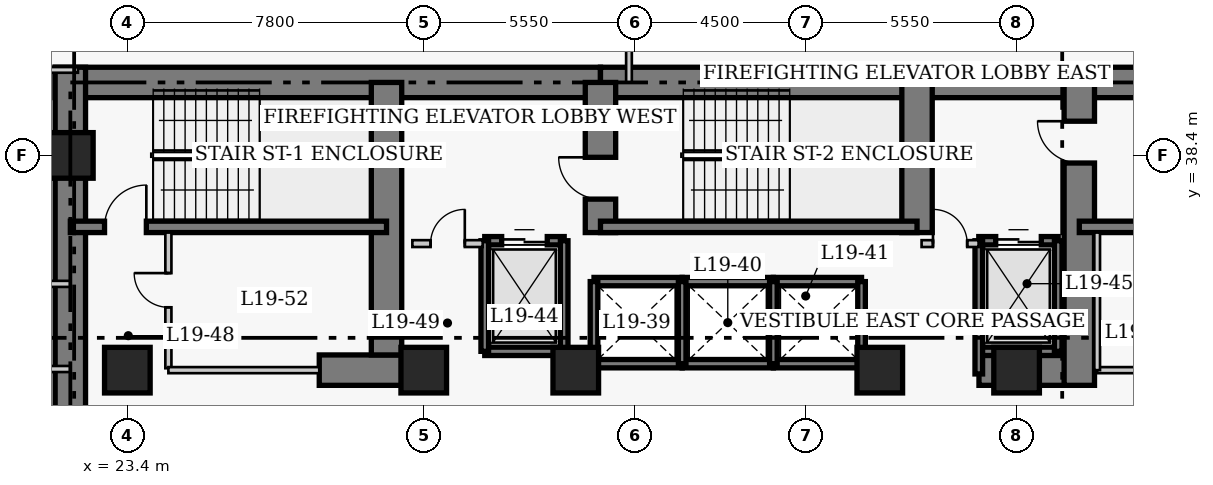
"""IFC4 building model, lengths in metres.
Left out: names, types, materials, properties, quantities, classifications, styles, units other than length and angle.
Written with IfcOpenShell. Run it as: python <this file> out.ifc"""

import sys

from ifc_helpers import new_model, si_unit, direction, frame, frame_2d, origin, origin_2d, place, context, subcontext, project, spatial, rectangle, extrude, element, fill, save


model = new_model("IFC4")
c1 = context("Model", 3, precision=1e-05, world=origin(), true_north=direction((0.0, 1.0)))
c2 = subcontext(c1, "Body", "Model", "MODEL_VIEW")
j1 = project(units=[si_unit("LENGTHUNIT", "METRE"), si_unit("PLANEANGLEUNIT", "RADIAN")], contexts=[c1])
p1 = place(None, origin())
s1 = spatial("IfcSite", under=j1, at=p1, CompositionType="ELEMENT")
p2 = place(p1, origin())
s2 = spatial("IfcBuilding", under=s1, at=p2, CompositionType="ELEMENT")
p3 = place(p2, frame((0.0, 0.0, 80.4)))
s3 = spatial("IfcBuildingStorey", under=s2, at=p3, CompositionType="ELEMENT", Elevation=80.4)
p4 = place(p3, frame((21.5, 40.32, 0.0), z_axis=(0.0, 0.0, 1.0), x_axis=(1.0, 0.0, 0.0)))
e1 = element("IfcWall", 1, at=p4, inside=s3, PredefinedType="SHEAR", context=c2, shape_type="SweptSolid", body=[
    extrude(rectangle(XDim=14.35, YDim=0.8, at=frame_2d((7.175, 0.0))), origin(), (0.0, 0.0, 1.0), 3.8),
])
p5 = place(p3, frame((35.85, 40.32, 0.0), z_axis=(0.0, 0.0, 1.0), x_axis=(1.0, 0.0, 0.0)))
e2 = element("IfcWall", 2, at=p5, inside=s3, PredefinedType="SHEAR", context=c2, shape_type="SweptSolid", body=[
    extrude(rectangle(XDim=12.6, YDim=0.8, at=frame_2d((6.3, 0.0))), origin(), (0.0, 0.0, 1.0), 3.8),
])
p6 = place(p3, frame((48.45, 40.32, 0.0), z_axis=(0.0, 0.0, 1.0), x_axis=(1.0, 0.0, 0.0)))
e3 = element("IfcWall", 3, at=p6, inside=s3, PredefinedType="SHEAR", context=c2, shape_type="SweptSolid", body=[
    extrude(rectangle(XDim=8.87, YDim=0.8, at=frame_2d((4.435, 0.0))), origin(), (0.0, 0.0, 1.0), 3.8),
])
p7 = place(p3, frame((21.9, 27.05, 0.0), z_axis=(0.0, 0.0, 1.0), x_axis=(0.0, 1.0, 0.0)))
e4 = element("IfcWall", 4, at=p7, inside=s3, PredefinedType="SHEAR", context=c2, shape_type="SweptSolid", body=[
    extrude(rectangle(XDim=13.67, YDim=0.8, at=frame_2d((6.835, 0.0))), origin(), (0.0, 0.0, 1.0), 3.8),
])
p8 = place(p3, frame((28.45, 32.75, 0.0), z_axis=(0.0, 0.0, 1.0), x_axis=(1.0, 0.0, 0.0)))
e5 = element("IfcWall", 5, at=p8, inside=s3, PredefinedType="SHEAR", context=c2, shape_type="SweptSolid", body=[
    extrude(rectangle(XDim=2.4, YDim=0.8, at=frame_2d((1.2, 0.0))), origin(), (0.0, 0.0, 1.0), 3.8),
])
p9 = place(p3, frame((45.81, 32.75, 0.0), z_axis=(0.0, 0.0, 1.0), x_axis=(1.0, 0.0, 0.0)))
e6 = element("IfcWall", 6, at=p9, inside=s3, PredefinedType="SHEAR", context=c2, shape_type="SweptSolid", body=[
    extrude(rectangle(XDim=2.64, YDim=0.8, at=frame_2d((1.32, 0.0))), origin(), (0.0, 0.0, 1.0), 3.8),
])
p10 = place(p3, frame((30.22, 33.15, 0.0), z_axis=(0.0, 0.0, 1.0), x_axis=(0.0, 1.0, 0.0)))
e7 = element("IfcWall", 7, at=p10, inside=s3, PredefinedType="SHEAR", context=c2, shape_type="SweptSolid", body=[
    extrude(rectangle(XDim=7.17, YDim=0.8, at=frame_2d((3.585, 0.0))), origin(), (0.0, 0.0, 1.0), 3.8),
])
p11 = place(p3, frame((35.85, 36.37, 0.0), z_axis=(0.0, 0.0, 1.0), x_axis=(0.0, 1.0, 0.0)))
e8 = element("IfcWall", 8, at=p11, inside=s3, PredefinedType="SHEAR", context=c2, shape_type="SweptSolid", body=[
    extrude(rectangle(XDim=3.95, YDim=0.8, at=frame_2d((1.975, 0.0))), origin(), (0.0, 0.0, 1.0), 3.8),
])
p12 = place(p11, frame((0.88, 0.0, 0.0)))
e9 = element("IfcOpeningElement", 9, at=p12, cuts=e8, PredefinedType="OPENING", context=c2, shape_type="SweptSolid", body=[
    extrude(rectangle(XDim=1.1, YDim=2.15, at=frame_2d((0.55, 1.075))), frame((0.0, 0.41, 0.0), z_axis=(0.0, -1.0, 0.0), x_axis=(1.0, 0.0, 0.0)), (0.0, 0.0, 1.0), 0.82),
])
p13 = place(p3, frame((44.18, 36.37, 0.0), z_axis=(0.0, 0.0, 1.0), x_axis=(0.0, 1.0, 0.0)))
e10 = element("IfcWall", 10, at=p13, inside=s3, PredefinedType="SHEAR", context=c2, shape_type="SweptSolid", body=[
    extrude(rectangle(XDim=3.95, YDim=0.8, at=frame_2d((1.975, 0.0))), origin(), (0.0, 0.0, 1.0), 3.8),
])
p14 = place(p3, frame((48.45, 32.35, 0.0), z_axis=(0.0, 0.0, 1.0), x_axis=(0.0, 1.0, 0.0)))
e11 = element("IfcWall", 11, at=p14, inside=s3, PredefinedType="SHEAR", context=c2, shape_type="SweptSolid", body=[
    extrude(rectangle(XDim=7.97, YDim=0.8, at=frame_2d((3.985, 0.0))), origin(), (0.0, 0.0, 1.0), 3.8),
])
p15 = place(p14, frame((5.85, 0.0, 0.0)))
e12 = element("IfcOpeningElement", 12, at=p15, cuts=e11, PredefinedType="OPENING", context=c2, shape_type="SweptSolid", body=[
    extrude(rectangle(XDim=1.1, YDim=2.15, at=frame_2d((0.55, 1.075))), frame((0.0, 0.41, 0.0), z_axis=(0.0, -1.0, 0.0), x_axis=(1.0, 0.0, 0.0)), (0.0, 0.0, 1.0), 0.82),
])
p16 = place(p3, frame((21.9, 36.52, 0.0), z_axis=(0.0, 0.0, 1.0), x_axis=(1.0, 0.0, 0.0)))
e13 = element("IfcWall", 13, at=p16, inside=s3, PredefinedType="SHEAR", context=c2, shape_type="SweptSolid", body=[
    extrude(rectangle(XDim=8.32, YDim=0.3, at=frame_2d((4.16, 0.0))), origin(), (0.0, 0.0, 1.0), 3.8),
])
p17 = place(p16, frame((0.9, 0.0, 0.0)))
e14 = element("IfcOpeningElement", 14, at=p17, cuts=e13, PredefinedType="OPENING", context=c2, shape_type="SweptSolid", body=[
    extrude(rectangle(XDim=1.1, YDim=2.15, at=frame_2d((0.55, 1.075))), frame((0.0, 0.16, 0.0), z_axis=(0.0, -1.0, 0.0), x_axis=(1.0, 0.0, 0.0)), (0.0, 0.0, 1.0), 0.32),
])
p18 = place(p3, frame((35.85, 36.52, 0.0), z_axis=(0.0, 0.0, 1.0), x_axis=(1.0, 0.0, 0.0)))
e15 = element("IfcWall", 15, at=p18, inside=s3, PredefinedType="SHEAR", context=c2, shape_type="SweptSolid", body=[
    extrude(rectangle(XDim=8.33, YDim=0.3, at=frame_2d((4.165, 0.0))), origin(), (0.0, 0.0, 1.0), 3.8),
])
p19 = place(p3, frame((48.45, 36.52, 0.0), z_axis=(0.0, 0.0, 1.0), x_axis=(1.0, 0.0, 0.0)))
e16 = element("IfcWall", 16, at=p19, inside=s3, PredefinedType="SHEAR", context=c2, shape_type="SweptSolid", body=[
    extrude(rectangle(XDim=8.47, YDim=0.3, at=frame_2d((4.235, 0.0))), origin(), (0.0, 0.0, 1.0), 3.8),
])
for number, where, z_axis, x_axis in (
    (17, (21.9, 38.4, 0.0), (0.0, 0.0, 1.0), (1.0, 0.0, 0.0)),
    (18, (23.4, 32.75, 0.0), (0.0, 0.0, 1.0), (1.0, 0.0, 0.0)),
    (19, (31.2, 32.75, 0.0), (0.0, 0.0, 1.0), (1.0, 0.0, 0.0)),
    (20, (35.2, 32.75, 0.0), (0.0, 0.0, 1.0), (1.0, 0.0, 0.0)),
    (21, (43.2, 32.75, 0.0), (0.0, 0.0, 1.0), (1.0, 0.0, 0.0)),
    (22, (46.8, 32.75, 0.0), (0.0, 0.0, 1.0), (1.0, 0.0, 0.0)),
):
    element("IfcColumn", number, at=place(p3, frame(where, z_axis=z_axis, x_axis=x_axis)), inside=s3, PredefinedType="COLUMN", context=c2, shape_type="SweptSolid", body=[
        extrude(rectangle(XDim=1.2, YDim=1.2, at=origin_2d()), origin(), (0.0, 0.0, 1.0), 3.8),
    ])
for number, where, z_axis, x_axis in (
    (23, (35.68, 35.08, 0.0), (0.0, 0.0, 1.0), (1.0, 0.0, 0.0)),
    (24, (35.68, 32.92, 0.0), (0.0, 0.0, 1.0), (1.0, 0.0, 0.0)),
):
    element("IfcWall", number, at=place(p3, frame(where, z_axis=z_axis, x_axis=x_axis)), inside=s3, PredefinedType="SHEAR", context=c2, shape_type="SweptSolid", body=[
        extrude(rectangle(XDim=2.32, YDim=0.22, at=frame_2d((1.16, 0.0))), origin(), (0.0, 0.0, 1.0), 3.8),
    ])
p20 = place(p3, frame((35.68, 32.92, 0.0), z_axis=(0.0, 0.0, 1.0), x_axis=(0.0, 1.0, 0.0)))
e25 = element("IfcWall", 25, at=p20, inside=s3, PredefinedType="SHEAR", context=c2, shape_type="SweptSolid", body=[
    extrude(rectangle(XDim=2.16, YDim=0.2, at=frame_2d((1.08, 0.0))), origin(), (0.0, 0.0, 1.0), 3.8),
])
for number, where, z_axis, x_axis in (
    (26, (38.0, 35.08, 0.0), (0.0, 0.0, 1.0), (1.0, 0.0, 0.0)),
    (27, (38.0, 32.92, 0.0), (0.0, 0.0, 1.0), (1.0, 0.0, 0.0)),
):
    element("IfcWall", number, at=place(p3, frame(where, z_axis=z_axis, x_axis=x_axis)), inside=s3, PredefinedType="SHEAR", context=c2, shape_type="SweptSolid", body=[
        extrude(rectangle(XDim=2.4, YDim=0.22, at=frame_2d((1.2, 0.0))), origin(), (0.0, 0.0, 1.0), 3.8),
    ])
p21 = place(p3, frame((38.0, 32.92, 0.0), z_axis=(0.0, 0.0, 1.0), x_axis=(0.0, 1.0, 0.0)))
e28 = element("IfcWall", 28, at=p21, inside=s3, PredefinedType="SHEAR", context=c2, shape_type="SweptSolid", body=[
    extrude(rectangle(XDim=2.16, YDim=0.2, at=frame_2d((1.08, 0.0))), origin(), (0.0, 0.0, 1.0), 3.8),
])
for number, where, z_axis, x_axis in (
    (29, (40.4, 35.08, 0.0), (0.0, 0.0, 1.0), (1.0, 0.0, 0.0)),
    (30, (40.4, 32.92, 0.0), (0.0, 0.0, 1.0), (1.0, 0.0, 0.0)),
):
    element("IfcWall", number, at=place(p3, frame(where, z_axis=z_axis, x_axis=x_axis)), inside=s3, PredefinedType="SHEAR", context=c2, shape_type="SweptSolid", body=[
        extrude(rectangle(XDim=2.32, YDim=0.22, at=frame_2d((1.16, 0.0))), origin(), (0.0, 0.0, 1.0), 3.8),
    ])
for number, where, z_axis, x_axis in (
    (31, (40.4, 32.92, 0.0), (0.0, 0.0, 1.0), (0.0, 1.0, 0.0)),
    (32, (42.72, 32.92, 0.0), (0.0, 0.0, 1.0), (0.0, 1.0, 0.0)),
):
    element("IfcWall", number, at=place(p3, frame(where, z_axis=z_axis, x_axis=x_axis)), inside=s3, PredefinedType="SHEAR", context=c2, shape_type="SweptSolid", body=[
        extrude(rectangle(XDim=2.16, YDim=0.2, at=frame_2d((1.08, 0.0))), origin(), (0.0, 0.0, 1.0), 3.8),
    ])
p22 = place(p3, frame((32.805, 36.155, 0.0), z_axis=(0.0, 0.0, 1.0), x_axis=(1.0, 0.0, 0.0)))
e33 = element("IfcWall", 33, at=p22, inside=s3, PredefinedType="SHEAR", context=c2, shape_type="SweptSolid", body=[
    extrude(rectangle(XDim=2.09, YDim=0.22, at=frame_2d((1.045, 0.0))), origin(), (0.0, 0.0, 1.0), 3.8),
])
p23 = place(p22, frame((0.445, 0.0, 0.0)))
e34 = element("IfcOpeningElement", 34, at=p23, cuts=e33, PredefinedType="OPENING", context=c2, shape_type="SweptSolid", body=[
    extrude(rectangle(XDim=1.2, YDim=2.15, at=frame_2d((0.6, 1.075))), frame((0.0, 0.12, 0.0), z_axis=(0.0, -1.0, 0.0), x_axis=(1.0, 0.0, 0.0)), (0.0, 0.0, 1.0), 0.24),
])
p24 = place(p3, frame((32.805, 33.245, 0.0), z_axis=(0.0, 0.0, 1.0), x_axis=(1.0, 0.0, 0.0)))
e35 = element("IfcWall", 35, at=p24, inside=s3, PredefinedType="SHEAR", context=c2, shape_type="SweptSolid", body=[
    extrude(rectangle(XDim=2.09, YDim=0.22, at=frame_2d((1.045, 0.0))), origin(), (0.0, 0.0, 1.0), 3.8),
])
for number, where, z_axis, x_axis in (
    (36, (32.805, 33.245, 0.0), (0.0, 0.0, 1.0), (0.0, 1.0, 0.0)),
    (37, (34.895, 33.245, 0.0), (0.0, 0.0, 1.0), (0.0, 1.0, 0.0)),
):
    element("IfcWall", number, at=place(p3, frame(where, z_axis=z_axis, x_axis=x_axis)), inside=s3, PredefinedType="SHEAR", context=c2, shape_type="SweptSolid", body=[
        extrude(rectangle(XDim=2.91, YDim=0.2, at=frame_2d((1.455, 0.0))), origin(), (0.0, 0.0, 1.0), 3.8),
    ])
p25 = place(p3, frame((45.805, 36.155, 0.0), z_axis=(0.0, 0.0, 1.0), x_axis=(1.0, 0.0, 0.0)))
e38 = element("IfcWall", 38, at=p25, inside=s3, PredefinedType="SHEAR", context=c2, shape_type="SweptSolid", body=[
    extrude(rectangle(XDim=2.09, YDim=0.22, at=frame_2d((1.045, 0.0))), origin(), (0.0, 0.0, 1.0), 3.8),
])
p26 = place(p25, frame((0.445, 0.0, 0.0)))
e39 = element("IfcOpeningElement", 39, at=p26, cuts=e38, PredefinedType="OPENING", context=c2, shape_type="SweptSolid", body=[
    extrude(rectangle(XDim=1.2, YDim=2.15, at=frame_2d((0.6, 1.075))), frame((0.0, 0.12, 0.0), z_axis=(0.0, -1.0, 0.0), x_axis=(1.0, 0.0, 0.0)), (0.0, 0.0, 1.0), 0.24),
])
p27 = place(p3, frame((45.805, 33.245, 0.0), z_axis=(0.0, 0.0, 1.0), x_axis=(1.0, 0.0, 0.0)))
e40 = element("IfcWall", 40, at=p27, inside=s3, PredefinedType="SHEAR", context=c2, shape_type="SweptSolid", body=[
    extrude(rectangle(XDim=2.09, YDim=0.22, at=frame_2d((1.045, 0.0))), origin(), (0.0, 0.0, 1.0), 3.8),
])
p28 = place(p3, frame((45.805, 32.65, 0.0), z_axis=(0.0, 0.0, 1.0), x_axis=(0.0, 1.0, 0.0)))
e41 = element("IfcWall", 41, at=p28, inside=s3, PredefinedType="SHEAR", context=c2, shape_type="SweptSolid", body=[
    extrude(rectangle(XDim=3.505, YDim=0.2, at=frame_2d((1.752, 0.0))), origin(), (0.0, 0.0, 1.0), 3.8),
])
p29 = place(p3, frame((47.895, 33.245, 0.0), z_axis=(0.0, 0.0, 1.0), x_axis=(0.0, 1.0, 0.0)))
e42 = element("IfcWall", 42, at=p29, inside=s3, PredefinedType="SHEAR", context=c2, shape_type="SweptSolid", body=[
    extrude(rectangle(XDim=2.91, YDim=0.2, at=frame_2d((1.455, 0.0))), origin(), (0.0, 0.0, 1.0), 3.8),
])
p30 = place(p3, frame((30.9, 36.08, 0.0), z_axis=(0.0, 0.0, 1.0), x_axis=(1.0, 0.0, 0.0)))
e43 = element("IfcWall", 43, at=p30, inside=s3, PredefinedType="PARTITIONING", context=c2, shape_type="SweptSolid", body=[
    extrude(rectangle(XDim=1.85, YDim=0.18, at=frame_2d((0.925, 0.0))), origin(), (0.0, 0.0, 1.0), 3.54),
])
p31 = place(p30, frame((0.48, 0.0, 0.0)))
e44 = element("IfcOpeningElement", 44, at=p31, cuts=e43, PredefinedType="OPENING", context=c2, shape_type="SweptSolid", body=[
    extrude(rectangle(XDim=0.9, YDim=2.15, at=frame_2d((0.45, 1.075))), frame((0.0, 0.1, 0.0), z_axis=(0.0, -1.0, 0.0), x_axis=(1.0, 0.0, 0.0)), (0.0, 0.0, 1.0), 0.2),
])
p32 = place(p3, frame((44.3, 36.08, 0.0), z_axis=(0.0, 0.0, 1.0), x_axis=(1.0, 0.0, 0.0)))
e45 = element("IfcWall", 45, at=p32, inside=s3, PredefinedType="PARTITIONING", context=c2, shape_type="SweptSolid", body=[
    extrude(rectangle(XDim=1.5, YDim=0.18, at=frame_2d((0.75, 0.0))), origin(), (0.0, 0.0, 1.0), 3.54),
])
p33 = place(p32, frame((0.3, 0.0, 0.0)))
e46 = element("IfcOpeningElement", 46, at=p33, cuts=e45, PredefinedType="OPENING", context=c2, shape_type="SweptSolid", body=[
    extrude(rectangle(XDim=0.9, YDim=2.15, at=frame_2d((0.45, 1.075))), frame((0.0, 0.1, 0.0), z_axis=(0.0, -1.0, 0.0), x_axis=(1.0, 0.0, 0.0)), (0.0, 0.0, 1.0), 0.2),
])
p34 = place(p3, frame((24.48, 32.8, 0.0), z_axis=(0.0, 0.0, 1.0), x_axis=(0.0, 1.0, 0.0)))
e47 = element("IfcWall", 47, at=p34, inside=s3, PredefinedType="PARTITIONING", context=c2, shape_type="SweptSolid", body=[
    extrude(rectangle(XDim=3.57, YDim=0.16, at=frame_2d((1.785, 0.0))), origin(), (0.0, 0.0, 1.0), 3.54),
])
p35 = place(p34, frame((1.604, 0.0, 0.0)))
e48 = element("IfcOpeningElement", 48, at=p35, cuts=e47, PredefinedType="OPENING", context=c2, shape_type="SweptSolid", body=[
    extrude(rectangle(XDim=0.9, YDim=2.1, at=frame_2d((0.45, 1.05))), frame((0.0, 0.09, 0.0), z_axis=(0.0, -1.0, 0.0), x_axis=(1.0, 0.0, 0.0)), (0.0, 0.0, 1.0), 0.18),
])
p36 = place(p3, frame((24.48, 32.75, 0.0), z_axis=(0.0, 0.0, 1.0), x_axis=(1.0, 0.0, 0.0)))
e49 = element("IfcWall", 49, at=p36, inside=s3, PredefinedType="PARTITIONING", context=c2, shape_type="SweptSolid", body=[
    extrude(rectangle(XDim=3.97, YDim=0.16, at=frame_2d((1.985, 0.0))), origin(), (0.0, 0.0, 1.0), 3.54),
])
p37 = place(p3, frame((48.92, 32.75, 0.0), z_axis=(0.0, 0.0, 1.0), x_axis=(1.0, 0.0, 0.0)))
e50 = element("IfcWall", 50, at=p37, inside=s3, PredefinedType="PARTITIONING", context=c2, shape_type="SweptSolid", body=[
    extrude(rectangle(XDim=2.2, YDim=0.16, at=frame_2d((1.1, 0.0))), origin(), (0.0, 0.0, 1.0), 3.54),
])
p38 = place(p3, frame((48.92, 32.75, 0.0), z_axis=(0.0, 0.0, 1.0), x_axis=(0.0, 1.0, 0.0)))
e51 = element("IfcWall", 51, at=p38, inside=s3, PredefinedType="PARTITIONING", context=c2, shape_type="SweptSolid", body=[
    extrude(rectangle(XDim=3.62, YDim=0.15, at=frame_2d((1.81, 0.0))), origin(), (0.0, 0.0, 1.0), 3.54),
])
for number, where, z_axis, x_axis in (
    (52, (18.86, 35.02, 0.0), (0.0, 0.0, 1.0), (1.0, 0.0, 0.0)),
    (53, (18.86, 32.78, 0.0), (0.0, 0.0, 1.0), (1.0, 0.0, 0.0)),
):
    element("IfcWall", number, at=place(p3, frame(where, z_axis=z_axis, x_axis=x_axis)), inside=s3, PredefinedType="PARTITIONING", context=c2, shape_type="SweptSolid", body=[
        extrude(rectangle(XDim=3.04, YDim=0.16, at=frame_2d((1.52, 0.0))), origin(), (0.0, 0.0, 1.0), 3.54),
    ])
p39 = place(p3, frame((16.64, 40.65, 0.0), z_axis=(0.0, 0.0, 1.0), x_axis=(1.0, 0.0, 0.0)))
e54 = element("IfcWall", 54, at=p39, inside=s3, PredefinedType="PARTITIONING", context=c2, shape_type="SweptSolid", body=[
    extrude(rectangle(XDim=5.46, YDim=0.15, at=frame_2d((2.73, 0.0))), origin(), (0.0, 0.0, 1.0), 3.54),
])
p40 = place(p39, frame((0.55, 0.0, 0.0)))
e55 = element("IfcOpeningElement", 55, at=p40, cuts=e54, PredefinedType="OPENING", context=c2, shape_type="SweptSolid", body=[
    extrude(rectangle(XDim=1.0, YDim=2.15, at=frame_2d((0.5, 1.075))), frame((0.0, 0.085, 0.0), z_axis=(0.0, -1.0, 0.0), x_axis=(1.0, 0.0, 0.0)), (0.0, 0.0, 1.0), 0.17),
])
p41 = place(p3, frame((36.6, 40.32, 0.0), z_axis=(0.0, 0.0, 1.0), x_axis=(0.0, 1.0, 0.0)))
e56 = element("IfcWall", 56, at=p41, inside=s3, PredefinedType="PARTITIONING", context=c2, shape_type="SweptSolid", body=[
    extrude(rectangle(XDim=3.445, YDim=0.15, at=frame_2d((1.723, 0.0))), origin(), (0.0, 0.0, 1.0), 3.54),
])
p42 = place(p23, origin())
e57 = element("IfcDoor", 57, at=p42, inside=s3, OperationType="DOUBLE_DOOR_SLIDING", PredefinedType="DOOR", context=c2, shape_type="SweptSolid", body=[
    extrude(rectangle(XDim=1.2, YDim=2.15, at=frame_2d((0.6, 1.075))), frame((0.0, 0.025, 0.0), z_axis=(0.0, -1.0, 0.0), x_axis=(1.0, 0.0, 0.0)), (0.0, 0.0, 1.0), 0.05),
])
fill(e34, e57)
p43 = place(p26, origin())
e58 = element("IfcDoor", 58, at=p43, inside=s3, OperationType="DOUBLE_DOOR_SLIDING", PredefinedType="DOOR", context=c2, shape_type="SweptSolid", body=[
    extrude(rectangle(XDim=1.2, YDim=2.15, at=frame_2d((0.6, 1.075))), frame((0.0, 0.025, 0.0), z_axis=(0.0, -1.0, 0.0), x_axis=(1.0, 0.0, 0.0)), (0.0, 0.0, 1.0), 0.05),
])
fill(e39, e58)
p44 = place(p31, origin())
e59 = element("IfcDoor", 59, at=p44, inside=s3, OperationType="SINGLE_SWING_RIGHT", PredefinedType="DOOR", context=c2, shape_type="SweptSolid", body=[
    extrude(rectangle(XDim=0.9, YDim=2.15, at=frame_2d((0.45, 1.075))), frame((0.0, 0.025, 0.0), z_axis=(0.0, -1.0, 0.0), x_axis=(1.0, 0.0, 0.0)), (0.0, 0.0, 1.0), 0.05),
])
fill(e44, e59)
p45 = place(p33, origin())
e60 = element("IfcDoor", 60, at=p45, inside=s3, OperationType="SINGLE_SWING_LEFT", PredefinedType="DOOR", context=c2, shape_type="SweptSolid", body=[
    extrude(rectangle(XDim=0.9, YDim=2.15, at=frame_2d((0.45, 1.075))), frame((0.0, 0.025, 0.0), z_axis=(0.0, -1.0, 0.0), x_axis=(1.0, 0.0, 0.0)), (0.0, 0.0, 1.0), 0.05),
])
fill(e46, e60)
p46 = place(p35, origin())
e61 = element("IfcDoor", 61, at=p46, inside=s3, OperationType="SINGLE_SWING_RIGHT", PredefinedType="DOOR", context=c2, shape_type="SweptSolid", body=[
    extrude(rectangle(XDim=0.9, YDim=2.1, at=frame_2d((0.45, 1.05))), frame((0.0, 0.025, 0.0), z_axis=(0.0, -1.0, 0.0), x_axis=(1.0, 0.0, 0.0)), (0.0, 0.0, 1.0), 0.05),
])
fill(e48, e61)
p47 = place(p17, origin())
e62 = element("IfcDoor", 62, at=p47, inside=s3, OperationType="SINGLE_SWING_RIGHT", PredefinedType="DOOR", context=c2, shape_type="SweptSolid", body=[
    extrude(rectangle(XDim=1.1, YDim=2.15, at=frame_2d((0.55, 1.075))), frame((0.0, 0.025, 0.0), z_axis=(0.0, -1.0, 0.0), x_axis=(1.0, 0.0, 0.0)), (0.0, 0.0, 1.0), 0.05),
])
fill(e14, e62)
p48 = place(p12, origin())
e63 = element("IfcDoor", 63, at=p48, inside=s3, OperationType="SINGLE_SWING_RIGHT", PredefinedType="DOOR", context=c2, shape_type="SweptSolid", body=[
    extrude(rectangle(XDim=1.1, YDim=2.15, at=frame_2d((0.55, 1.075))), frame((0.0, 0.025, 0.0), z_axis=(0.0, -1.0, 0.0), x_axis=(1.0, 0.0, 0.0)), (0.0, 0.0, 1.0), 0.05),
])
fill(e9, e63)
p49 = place(p15, origin())
e64 = element("IfcDoor", 64, at=p49, inside=s3, OperationType="SINGLE_SWING_RIGHT", PredefinedType="DOOR", context=c2, shape_type="SweptSolid", body=[
    extrude(rectangle(XDim=1.1, YDim=2.15, at=frame_2d((0.55, 1.075))), frame((0.0, 0.025, 0.0), z_axis=(0.0, -1.0, 0.0), x_axis=(1.0, 0.0, 0.0)), (0.0, 0.0, 1.0), 0.05),
])
fill(e12, e64)
save(model, sys.argv[1])
